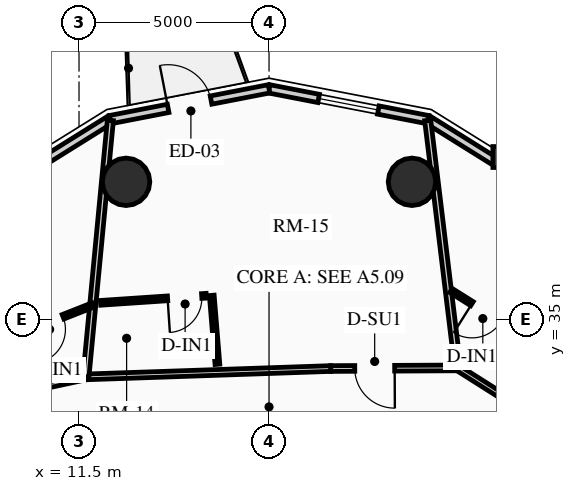
"""IFC4 building model, lengths in metres.
Left out: names, types, materials, properties, quantities, classifications, styles, units other than length and angle.
Written with IfcOpenShell. Run it as: python <this file> out.ifc"""

import sys

from ifc_helpers import new_model, si_unit, direction, frame, frame_2d, origin, origin_2d, place, context, subcontext, project, spatial, rectangle, circle, extrude, source, transform, mapped, element, fill, save


model = new_model("IFC4")
c1 = context("Model", 3, precision=1e-05, world=origin(), true_north=direction((0.0, 1.0)))
c2 = subcontext(c1, "Body", "Model", "MODEL_VIEW")
j1 = project(units=[si_unit("LENGTHUNIT", "METRE"), si_unit("PLANEANGLEUNIT", "RADIAN")], contexts=[c1])
p1 = place(None, origin())
s1 = spatial("IfcSite", under=j1, at=p1, CompositionType="ELEMENT")
p2 = place(p1, origin())
s2 = spatial("IfcBuilding", under=s1, at=p2, CompositionType="ELEMENT")
p3 = place(p2, frame((0.0, 0.0, 180.7)))
s3 = spatial("IfcBuildingStorey", under=s2, at=p3, CompositionType="ELEMENT", Elevation=180.7)
for number, where, z_axis, x_axis in (
    (1, (20.261, 38.623, 0.0), (0.0, 0.0, 1.0), (1.0, 0.0, 0.0)),
    (2, (12.739, 38.623, 0.0), (0.0, 0.0, 1.0), (1.0, 0.0, 0.0)),
):
    element("IfcColumn", number, at=place(p3, frame(where, z_axis=z_axis, x_axis=x_axis)), inside=s3, PredefinedType="USERDEFINED", context=c2, shape_type="SweptSolid", body=[
        extrude(circle(Radius=0.625, at=origin_2d()), origin(), (0.0, 0.0, 1.0), 2.91),
    ])
p4 = place(p3, frame((20.681, 40.259, 0.0), z_axis=(0.0, 0.0, 1.0), x_axis=(0.848399108042, -0.529357113368, 0.0)))
e3 = element("IfcWall", 3, at=p4, inside=s3, PredefinedType="SOLIDWALL", context=c2, shape_type="SweptSolid", body=[
    extrude(rectangle(XDim=4.446, YDim=0.22, at=frame_2d((2.223, 0.0))), origin(), (0.0, 0.0, 1.0), 2.245),
])
p5 = place(p3, frame((16.5, 41.07, 0.0), z_axis=(0.0, 0.0, 1.0), x_axis=(0.981703883443, -0.190413983815, 0.0)))
e4 = element("IfcWall", 4, at=p5, inside=s3, PredefinedType="SOLIDWALL", context=c2, shape_type="SweptSolid", body=[
    extrude(rectangle(XDim=4.259, YDim=0.22, at=frame_2d((2.13, 0.0))), origin(), (0.0, 0.0, 1.0), 2.245),
])
m1 = source(origin(), c2, "Body", "SweptSolid", [
    extrude(rectangle(XDim=1.6, YDim=1.3, at=frame_2d((0.8, 0.65))), frame((0.0, 0.12, 0.0), z_axis=(0.0, -1.0, 0.0), x_axis=(1.0, 0.0, 0.0)), (0.0, 0.0, 1.0), 0.24),
])
p6 = place(p5, frame((1.33, 0.0, 0.65)))
e5 = element("IfcOpeningElement", 5, at=p6, cuts=e4, PredefinedType="OPENING", context=c2, shape_type="MappedRepresentation", body=[
    mapped(m1, transform((0.0, 0.0, 0.0), x_axis=(1.0, 0.0, 0.0), y_axis=(0.0, 1.0, 0.0), z_axis=(0.0, 0.0, 1.0), scale=1.0)),
])
p7 = place(p3, frame((12.319, 40.259, 0.0), z_axis=(0.0, 0.0, 1.0), x_axis=(0.981703883443, 0.190413983815, 0.0)))
e6 = element("IfcWall", 6, at=p7, inside=s3, PredefinedType="SOLIDWALL", context=c2, shape_type="SweptSolid", body=[
    extrude(rectangle(XDim=4.259, YDim=0.22, at=frame_2d((2.13, 0.0))), origin(), (0.0, 0.0, 1.0), 2.245),
])
m2 = source(origin(), c2, "Body", "SweptSolid", [
    extrude(rectangle(XDim=1.15, YDim=2.005, at=frame_2d((0.575, 1.002))), frame((0.0, 0.12, 0.0), z_axis=(0.0, -1.0, 0.0), x_axis=(1.0, 0.0, 0.0)), (0.0, 0.0, 1.0), 0.24),
])
p8 = place(p7, frame((1.555, 0.0, 0.0)))
e7 = element("IfcOpeningElement", 7, at=p8, cuts=e6, PredefinedType="OPENING", context=c2, shape_type="MappedRepresentation", body=[
    mapped(m2, transform((0.0, 0.0, 0.0), x_axis=(1.0, 0.0, 0.0), y_axis=(0.0, 1.0, 0.0), z_axis=(0.0, 0.0, 1.0), scale=1.0)),
])
p9 = place(p3, frame((8.547, 37.906, 0.0), z_axis=(0.0, 0.0, 1.0), x_axis=(0.848399108042, 0.529357113368, 0.0)))
e8 = element("IfcWall", 8, at=p9, inside=s3, PredefinedType="SOLIDWALL", context=c2, shape_type="SweptSolid", body=[
    extrude(rectangle(XDim=4.446, YDim=0.22, at=frame_2d((2.223, 0.0))), origin(), (0.0, 0.0, 1.0), 2.245),
])
p10 = place(p3, frame((22.797, 32.883, 0.0), z_axis=(0.0, 0.0, 1.0), x_axis=(-0.84484009232, 0.535018895375, 0.0)))
e9 = element("IfcWall", 9, at=p10, inside=s3, PredefinedType="PARTITIONING", context=c2, shape_type="SweptSolid", body=[
    extrude(rectangle(XDim=1.575, YDim=0.15, at=frame_2d((0.788, 0.0))), origin(), (0.0, 0.0, 1.0), 2.245),
])
p11 = place(p3, frame((21.466, 33.726, 0.0), z_axis=(0.0, 0.0, 1.0), x_axis=(-0.99998838579, -0.004819573058, 0.0)))
e10 = element("IfcWall", 10, at=p11, inside=s3, PredefinedType="PARTITIONING", context=c2, shape_type="SweptSolid", body=[
    extrude(rectangle(XDim=3.343, YDim=0.15, at=frame_2d((1.672, 0.0))), origin(), (0.0, 0.0, 1.0), 2.245),
])
m3 = source(origin(), c2, "Body", "SweptSolid", [
    extrude(rectangle(XDim=1.05, YDim=2.015, at=frame_2d((0.525, 1.007))), frame((0.0, 0.085, 0.0), z_axis=(0.0, -1.0, 0.0), x_axis=(1.0, 0.0, 0.0)), (0.0, 0.0, 1.0), 0.17),
])
p12 = place(p11, frame((1.66, 0.0, 0.0)))
e11 = element("IfcOpeningElement", 11, at=p12, cuts=e10, PredefinedType="OPENING", context=c2, shape_type="MappedRepresentation", body=[
    mapped(m3, transform((0.0, 0.0, 0.0), x_axis=(1.0, 0.0, 0.0), y_axis=(0.0, 1.0, 0.0), z_axis=(0.0, 0.0, 1.0), scale=1.0)),
])
p13 = place(p3, frame((18.123, 33.709, 0.0), z_axis=(0.0, 0.0, 1.0), x_axis=(-0.999417459976, -0.034128297572, 0.0)))
e12 = element("IfcWall", 12, at=p13, inside=s3, PredefinedType="PARTITIONING", context=c2, shape_type="SweptSolid", body=[
    extrude(rectangle(XDim=6.445, YDim=0.15, at=frame_2d((3.223, 0.0))), origin(), (0.0, 0.0, 1.0), 2.245),
])
p14 = place(p3, frame((11.681, 33.49, 0.0), z_axis=(0.0, 0.0, 1.0), x_axis=(-0.977628265995, -0.2103401377, 0.0)))
e13 = element("IfcWall", 13, at=p14, inside=s3, PredefinedType="PARTITIONING", context=c2, shape_type="SweptSolid", body=[
    extrude(rectangle(XDim=1.912, YDim=0.15, at=frame_2d((0.956, 0.0))), origin(), (0.0, 0.0, 1.0), 2.245),
])
p15 = place(p3, frame((21.466, 33.726, 0.0), z_axis=(0.0, 0.0, 1.0), x_axis=(-0.12050358126, 0.992712892484, 0.0)))
e14 = element("IfcWall", 14, at=p15, inside=s3, PredefinedType="PARTITIONING", context=c2, shape_type="SweptSolid", body=[
    extrude(rectangle(XDim=6.562, YDim=0.16, at=frame_2d((3.281, 0.0))), origin(), (0.0, 0.0, 1.0), 2.245),
])
p16 = place(p3, frame((11.681, 33.49, 0.0), z_axis=(0.0, 0.0, 1.0), x_axis=(0.094975594504, 0.995479601222, 0.0)))
e15 = element("IfcWall", 15, at=p16, inside=s3, PredefinedType="PARTITIONING", context=c2, shape_type="SweptSolid", body=[
    extrude(rectangle(XDim=6.781, YDim=0.16, at=frame_2d((3.391, 0.0))), origin(), (0.0, 0.0, 1.0), 2.245),
])
p17 = place(p3, frame((22.975, 34.704, 0.0), z_axis=(0.0, 0.0, 1.0), x_axis=(-0.84683355027, 0.531858005615, 0.0)))
e16 = element("IfcWall", 16, at=p17, inside=s3, PredefinedType="PARTITIONING", context=c2, shape_type="SweptSolid", body=[
    extrude(rectangle(XDim=1.994, YDim=0.125, at=frame_2d((0.997, 0.0))), origin(), (0.0, 0.0, 1.0), 2.675),
])
m4 = source(origin(), c2, "Body", "SweptSolid", [
    extrude(rectangle(XDim=0.9, YDim=2.005, at=frame_2d((0.45, 1.002))), frame((0.0, 0.073, 0.0), z_axis=(0.0, -1.0, 0.0), x_axis=(1.0, 0.0, 0.0)), (0.0, 0.0, 1.0), 0.145),
])
p18 = place(p17, frame((0.44, 0.0, 0.0)))
e17 = element("IfcOpeningElement", 17, at=p18, cuts=e16, PredefinedType="OPENING", context=c2, shape_type="MappedRepresentation", body=[
    mapped(m4, transform((0.0, 0.0, 0.0), x_axis=(1.0, 0.0, 0.0), y_axis=(0.0, 1.0, 0.0), z_axis=(0.0, 0.0, 1.0), scale=1.0)),
])
p19 = place(p3, frame((15.142, 33.82, 0.0), z_axis=(0.0, 0.0, 1.0), x_axis=(-0.081791493646, 0.996649462734, 0.0)))
e18 = element("IfcWall", 18, at=p19, inside=s3, PredefinedType="PARTITIONING", context=c2, shape_type="SweptSolid", body=[
    extrude(rectangle(XDim=1.821, YDim=0.125, at=frame_2d((0.91, 0.0))), origin(), (0.0, 0.0, 1.0), 2.675),
])
p20 = place(p3, frame((14.848, 35.625, 0.0), z_axis=(0.0, 0.0, 1.0), x_axis=(-0.997750908336, -0.067030775874, 0.0)))
e19 = element("IfcWall", 19, at=p20, inside=s3, PredefinedType="PARTITIONING", context=c2, shape_type="SweptSolid", body=[
    extrude(rectangle(XDim=2.786, YDim=0.125, at=frame_2d((1.393, 0.0))), origin(), (0.0, 0.0, 1.0), 2.245),
])
p21 = place(p20, frame((0.12, 0.0, 0.0)))
e20 = element("IfcOpeningElement", 20, at=p21, cuts=e19, PredefinedType="OPENING", context=c2, shape_type="MappedRepresentation", body=[
    mapped(m4, transform((0.0, 0.0, 0.0), x_axis=(1.0, 0.0, 0.0), y_axis=(0.0, 1.0, 0.0), z_axis=(0.0, 0.0, 1.0), scale=1.0)),
])
p22 = place(p3, frame((11.861, 35.38, 0.0), z_axis=(0.0, 0.0, 1.0), x_axis=(-0.930124609977, -0.367244074037, 0.0)))
e21 = element("IfcWall", 21, at=p22, inside=s3, PredefinedType="PARTITIONING", context=c2, shape_type="SweptSolid", body=[
    extrude(rectangle(XDim=2.581, YDim=0.125, at=frame_2d((1.291, 0.0))), origin(), (0.0, 0.0, 1.0), 2.245),
])
p23 = place(p22, frame((0.84, 0.0, 0.0)))
e22 = element("IfcOpeningElement", 22, at=p23, cuts=e21, PredefinedType="OPENING", context=c2, shape_type="MappedRepresentation", body=[
    mapped(m4, transform((0.0, 0.0, 0.0), x_axis=(1.0, 0.0, 0.0), y_axis=(0.0, 1.0, 0.0), z_axis=(0.0, 0.0, 1.0), scale=1.0)),
])
m5 = source(origin(), c2, "Body", "SweptSolid", [
    extrude(rectangle(XDim=1.6, YDim=1.3, at=frame_2d((0.8, 0.65))), frame((0.0, 0.03, 0.0), z_axis=(0.0, -1.0, 0.0), x_axis=(1.0, 0.0, 0.0)), (0.0, 0.0, 1.0), 0.06),
])
p24 = place(p6, origin())
e23 = element("IfcWindow", 23, at=p24, inside=s3, PartitioningType="SINGLE_PANEL", PredefinedType="WINDOW", context=c2, shape_type="MappedRepresentation", body=[
    mapped(m5, transform((0.0, 0.0, 0.0), x_axis=(1.0, 0.0, 0.0), y_axis=(0.0, 1.0, 0.0), z_axis=(0.0, 0.0, 1.0), scale=1.0)),
])
fill(e5, e23)
m6 = source(origin(), c2, "Body", "SweptSolid", [
    extrude(rectangle(XDim=1.15, YDim=2.005, at=frame_2d((0.575, 1.002))), frame((0.0, 0.025, 0.0), z_axis=(0.0, -1.0, 0.0), x_axis=(1.0, 0.0, 0.0)), (0.0, 0.0, 1.0), 0.05),
])
p25 = place(p8, origin())
e24 = element("IfcDoor", 24, at=p25, inside=s3, OperationType="SINGLE_SWING_LEFT", PredefinedType="DOOR", context=c2, shape_type="MappedRepresentation", body=[
    mapped(m6, transform((0.0, 0.0, 0.0), x_axis=(1.0, 0.0, 0.0), y_axis=(0.0, 1.0, 0.0), z_axis=(0.0, 0.0, 1.0), scale=1.0)),
])
fill(e7, e24)
m7 = source(origin(), c2, "Body", "SweptSolid", [
    extrude(rectangle(XDim=0.9, YDim=2.005, at=frame_2d((0.45, 1.002))), frame((0.0, 0.025, 0.0), z_axis=(0.0, -1.0, 0.0), x_axis=(1.0, 0.0, 0.0)), (0.0, 0.0, 1.0), 0.05),
])
p26 = place(p18, origin())
e25 = element("IfcDoor", 25, at=p26, inside=s3, OperationType="SINGLE_SWING_RIGHT", PredefinedType="DOOR", context=c2, shape_type="MappedRepresentation", body=[
    mapped(m7, transform((0.0, 0.0, 0.0), x_axis=(1.0, 0.0, 0.0), y_axis=(0.0, 1.0, 0.0), z_axis=(0.0, 0.0, 1.0), scale=1.0)),
])
fill(e17, e25)
m8 = source(origin(), c2, "Body", "SweptSolid", [
    extrude(rectangle(XDim=1.05, YDim=2.015, at=frame_2d((0.525, 1.007))), frame((0.0, 0.025, 0.0), z_axis=(0.0, -1.0, 0.0), x_axis=(1.0, 0.0, 0.0)), (0.0, 0.0, 1.0), 0.05),
])
p27 = place(p12, origin())
e26 = element("IfcDoor", 26, at=p27, inside=s3, OperationType="SINGLE_SWING_LEFT", PredefinedType="DOOR", context=c2, shape_type="MappedRepresentation", body=[
    mapped(m8, transform((0.0, 0.0, 0.0), x_axis=(1.0, 0.0, 0.0), y_axis=(0.0, 1.0, 0.0), z_axis=(0.0, 0.0, 1.0), scale=1.0)),
])
fill(e11, e26)
p28 = place(p21, origin())
e27 = element("IfcDoor", 27, at=p28, inside=s3, OperationType="SINGLE_SWING_RIGHT", PredefinedType="DOOR", context=c2, shape_type="MappedRepresentation", body=[
    mapped(m7, transform((0.0, 0.0, 0.0), x_axis=(1.0, 0.0, 0.0), y_axis=(0.0, 1.0, 0.0), z_axis=(0.0, 0.0, 1.0), scale=1.0)),
])
fill(e20, e27)
p29 = place(p23, origin())
e28 = element("IfcDoor", 28, at=p29, inside=s3, OperationType="SINGLE_SWING_RIGHT", PredefinedType="DOOR", context=c2, shape_type="MappedRepresentation", body=[
    mapped(m7, transform((0.0, 0.0, 0.0), x_axis=(1.0, 0.0, 0.0), y_axis=(0.0, 1.0, 0.0), z_axis=(0.0, 0.0, 1.0), scale=1.0)),
])
fill(e22, e28)
save(model, sys.argv[1])
